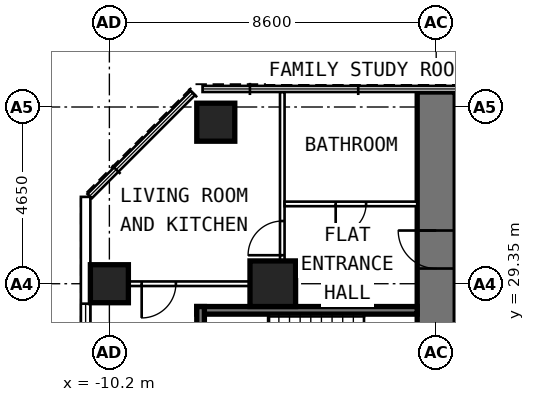
"""IFC4 building model, lengths in metres.
Left out: names, types, materials, properties, quantities, classifications, styles, units other than length and angle.
Written with IfcOpenShell. Run it as: python <this file> out.ifc"""

import sys

from ifc_helpers import new_model, si_unit, direction, frame, frame_2d, origin, origin_2d, place, context, subcontext, project, spatial, rectangle, extrude, element, fill, save


model = new_model("IFC4")
c1 = context("Model", 3, precision=1e-05, world=origin(), true_north=direction((0.0, 1.0)))
c2 = subcontext(c1, "Body", "Model", "MODEL_VIEW")
j1 = project(units=[si_unit("LENGTHUNIT", "METRE"), si_unit("PLANEANGLEUNIT", "RADIAN")], contexts=[c1])
p1 = place(None, origin())
s1 = spatial("IfcSite", under=j1, at=p1, CompositionType="ELEMENT")
p2 = place(p1, origin())
s2 = spatial("IfcBuilding", under=s1, at=p2, CompositionType="ELEMENT")
p3 = place(p2, frame((0.0, 0.0, 61.0)))
s3 = spatial("IfcBuildingStorey", under=s2, at=p3, CompositionType="ELEMENT", Elevation=61.0)
for number, where, z_axis, x_axis in (
    (1, (-10.2, 29.35, 0.0), (0.0, 0.0, 1.0), (0.0, 1.0, 0.0)),
    (2, (-7.4, 33.6, 0.0), (0.0, 0.0, 1.0), (0.0, 1.0, 0.0)),
):
    element("IfcColumn", number, at=place(p3, frame(where, z_axis=z_axis, x_axis=x_axis)), inside=s3, PredefinedType="COLUMN", context=c2, shape_type="SweptSolid", body=[
        extrude(rectangle(XDim=1.0, YDim=1.0, at=origin_2d()), origin(), (0.0, 0.0, 1.0), 3.6),
    ])
p4 = place(p3, frame((-5.9, 29.35, 0.0), z_axis=(0.0, 0.0, 1.0), x_axis=(0.0, 1.0, 0.0)))
e3 = element("IfcColumn", 3, at=p4, inside=s3, PredefinedType="COLUMN", context=c2, shape_type="SweptSolid", body=[
    extrude(rectangle(XDim=1.2, YDim=1.2, at=origin_2d()), origin(), (0.0, 0.0, 1.0), 3.6),
])
p5 = place(p3, frame((-1.6, 23.65, 0.0), z_axis=(0.0, 0.0, 1.0), x_axis=(0.0, 1.0, 0.0)))
e4 = element("IfcWall", 4, at=p5, inside=s3, PredefinedType="SHEAR", context=c2, shape_type="SweptSolid", body=[
    extrude(rectangle(XDim=10.745, YDim=1.0, at=frame_2d((5.373, 0.0))), origin(), (0.0, 0.0, 1.0), 3.6),
])
p6 = place(p5, frame((6.1, 0.0, 0.0)))
e5 = element("IfcOpeningElement", 5, at=p6, cuts=e4, PredefinedType="OPENING", context=c2, shape_type="SweptSolid", body=[
    extrude(rectangle(XDim=1.0, YDim=2.1, at=frame_2d((0.5, 1.05))), frame((0.0, 0.512, 0.0), z_axis=(0.0, -1.0, 0.0), x_axis=(1.0, 0.0, 0.0)), (0.0, 0.0, 1.0), 1.024),
])
p7 = place(p5, frame((1.35, 0.0, 0.0)))
e6 = element("IfcOpeningElement", 6, at=p7, cuts=e4, PredefinedType="OPENING", context=c2, shape_type="SweptSolid", body=[
    extrude(rectangle(XDim=1.0, YDim=2.1, at=frame_2d((0.5, 1.05))), frame((0.0, 0.512, 0.0), z_axis=(0.0, -1.0, 0.0), x_axis=(1.0, 0.0, 0.0)), (0.0, 0.0, 1.0), 1.024),
])
p8 = place(p3, frame((-10.825, 6.148, 0.0), z_axis=(0.0, 0.0, 1.0), x_axis=(0.0, 1.0, 0.0)))
e7 = element("IfcWall", 7, at=p8, inside=s3, PredefinedType="SOLIDWALL", context=c2, shape_type="SweptSolid", body=[
    extrude(rectangle(XDim=25.487, YDim=0.25, at=frame_2d((12.744, 0.0))), origin(), (0.0, 0.0, 1.0), 3.35),
])
p9 = place(p8, frame((0.927, 0.0, 0.8)))
e8 = element("IfcOpeningElement", 8, at=p9, cuts=e7, PredefinedType="OPENING", context=c2, shape_type="SweptSolid", body=[
    extrude(rectangle(XDim=1.8, YDim=1.8, at=frame_2d((0.9, 0.9))), frame((0.0, 0.137, 0.0), z_axis=(0.0, -1.0, 0.0), x_axis=(1.0, 0.0, 0.0)), (0.0, 0.0, 1.0), 0.274),
])
p10 = place(p8, frame((3.777, 0.0, 0.8)))
e9 = element("IfcOpeningElement", 9, at=p10, cuts=e7, PredefinedType="OPENING", context=c2, shape_type="SweptSolid", body=[
    extrude(rectangle(XDim=1.8, YDim=1.8, at=frame_2d((0.9, 0.9))), frame((0.0, 0.137, 0.0), z_axis=(0.0, -1.0, 0.0), x_axis=(1.0, 0.0, 0.0)), (0.0, 0.0, 1.0), 0.274),
])
p11 = place(p8, frame((6.627, 0.0, 0.8)))
e10 = element("IfcOpeningElement", 10, at=p11, cuts=e7, PredefinedType="OPENING", context=c2, shape_type="SweptSolid", body=[
    extrude(rectangle(XDim=1.8, YDim=1.8, at=frame_2d((0.9, 0.9))), frame((0.0, 0.137, 0.0), z_axis=(0.0, -1.0, 0.0), x_axis=(1.0, 0.0, 0.0)), (0.0, 0.0, 1.0), 0.274),
])
p12 = place(p8, frame((9.477, 0.0, 0.8)))
e11 = element("IfcOpeningElement", 11, at=p12, cuts=e7, PredefinedType="OPENING", context=c2, shape_type="SweptSolid", body=[
    extrude(rectangle(XDim=1.8, YDim=1.8, at=frame_2d((0.9, 0.9))), frame((0.0, 0.137, 0.0), z_axis=(0.0, -1.0, 0.0), x_axis=(1.0, 0.0, 0.0)), (0.0, 0.0, 1.0), 0.274),
])
p13 = place(p8, frame((12.327, 0.0, 0.8)))
e12 = element("IfcOpeningElement", 12, at=p13, cuts=e7, PredefinedType="OPENING", context=c2, shape_type="SweptSolid", body=[
    extrude(rectangle(XDim=1.8, YDim=1.8, at=frame_2d((0.9, 0.9))), frame((0.0, 0.137, 0.0), z_axis=(0.0, -1.0, 0.0), x_axis=(1.0, 0.0, 0.0)), (0.0, 0.0, 1.0), 0.274),
])
p14 = place(p8, frame((15.177, 0.0, 0.8)))
e13 = element("IfcOpeningElement", 13, at=p14, cuts=e7, PredefinedType="OPENING", context=c2, shape_type="SweptSolid", body=[
    extrude(rectangle(XDim=1.8, YDim=1.8, at=frame_2d((0.9, 0.9))), frame((0.0, 0.137, 0.0), z_axis=(0.0, -1.0, 0.0), x_axis=(1.0, 0.0, 0.0)), (0.0, 0.0, 1.0), 0.274),
])
p15 = place(p8, frame((18.027, 0.0, 0.8)))
e14 = element("IfcOpeningElement", 14, at=p15, cuts=e7, PredefinedType="OPENING", context=c2, shape_type="SweptSolid", body=[
    extrude(rectangle(XDim=1.8, YDim=1.8, at=frame_2d((0.9, 0.9))), frame((0.0, 0.137, 0.0), z_axis=(0.0, -1.0, 0.0), x_axis=(1.0, 0.0, 0.0)), (0.0, 0.0, 1.0), 0.274),
])
p16 = place(p8, frame((20.877, 0.0, 0.8)))
e15 = element("IfcOpeningElement", 15, at=p16, cuts=e7, PredefinedType="OPENING", context=c2, shape_type="SweptSolid", body=[
    extrude(rectangle(XDim=1.8, YDim=1.8, at=frame_2d((0.9, 0.9))), frame((0.0, 0.137, 0.0), z_axis=(0.0, -1.0, 0.0), x_axis=(1.0, 0.0, 0.0)), (0.0, 0.0, 1.0), 0.274),
])
p17 = place(p3, frame((-5.71, 29.35, 0.0), z_axis=(0.0, 0.0, 1.0), x_axis=(-1.0, 0.0, 0.0)))
e16 = element("IfcWall", 16, at=p17, inside=s3, PredefinedType="PARTITIONING", context=c2, shape_type="SweptSolid", body=[
    extrude(rectangle(XDim=4.99, YDim=0.12, at=frame_2d((2.495, 0.0))), origin(), (0.0, 0.0, 1.0), 2.45),
])
p18 = place(p17, frame((2.74, 0.0, 0.0)))
e17 = element("IfcOpeningElement", 17, at=p18, cuts=e16, PredefinedType="OPENING", context=c2, shape_type="SweptSolid", body=[
    extrude(rectangle(XDim=0.9, YDim=2.1, at=frame_2d((0.45, 1.05))), frame((0.0, 0.072, 0.0), z_axis=(0.0, -1.0, 0.0), x_axis=(1.0, 0.0, 0.0)), (0.0, 0.0, 1.0), 0.144),
])
p19 = place(p3, frame((-5.65, 28.95, 0.0), z_axis=(0.0, 0.0, 1.0), x_axis=(0.0, 1.0, 0.0)))
e18 = element("IfcWall", 18, at=p19, inside=s3, PredefinedType="PARTITIONING", context=c2, shape_type="SweptSolid", body=[
    extrude(rectangle(XDim=5.445, YDim=0.12, at=frame_2d((2.723, 0.0))), origin(), (0.0, 0.0, 1.0), 3.35),
])
p20 = place(p19, frame((1.15, 0.0, 0.0)))
e19 = element("IfcOpeningElement", 19, at=p20, cuts=e18, PredefinedType="OPENING", context=c2, shape_type="SweptSolid", body=[
    extrude(rectangle(XDim=0.9, YDim=2.1, at=frame_2d((0.45, 1.05))), frame((0.0, 0.072, 0.0), z_axis=(0.0, -1.0, 0.0), x_axis=(1.0, 0.0, 0.0)), (0.0, 0.0, 1.0), 0.144),
])
p21 = place(p3, frame((-2.1, 31.45, 0.0), z_axis=(0.0, 0.0, 1.0), x_axis=(-1.0, 0.0, 0.0)))
e20 = element("IfcWall", 20, at=p21, inside=s3, PredefinedType="PARTITIONING", context=c2, shape_type="SweptSolid", body=[
    extrude(rectangle(XDim=3.49, YDim=0.12, at=frame_2d((1.745, 0.0))), origin(), (0.0, 0.0, 1.0), 3.35),
])
p22 = place(p21, frame((1.345, 0.0, 0.0)))
e21 = element("IfcOpeningElement", 21, at=p22, cuts=e20, PredefinedType="OPENING", context=c2, shape_type="SweptSolid", body=[
    extrude(rectangle(XDim=0.8, YDim=2.1, at=frame_2d((0.4, 1.05))), frame((0.0, 0.072, 0.0), z_axis=(0.0, -1.0, 0.0), x_axis=(1.0, 0.0, 0.0)), (0.0, 0.0, 1.0), 0.144),
])
p23 = place(p3, frame((-2.1, 28.65, 0.0), z_axis=(0.0, 0.0, 1.0), x_axis=(-1.0, 0.0, 0.0)))
e22 = element("IfcWall", 22, at=p23, inside=s3, PredefinedType="SHEAR", context=c2, shape_type="SweptSolid", body=[
    extrude(rectangle(XDim=5.8, YDim=0.2, at=frame_2d((2.9, 0.0))), origin(), (0.0, 0.0, 1.0), 3.33),
])
p24 = place(p3, frame((-7.8, 24.75, 0.0), z_axis=(0.0, 0.0, 1.0), x_axis=(0.0, 1.0, 0.0)))
e23 = element("IfcWall", 23, at=p24, inside=s3, PredefinedType="SHEAR", context=c2, shape_type="SweptSolid", body=[
    extrude(rectangle(XDim=4.0, YDim=0.2, at=frame_2d((2.0, 0.0))), origin(), (0.0, 0.0, 1.0), 3.33),
])
p25 = place(p16, origin())
e24 = element("IfcWindow", 24, at=p25, inside=s3, PartitioningType="SINGLE_PANEL", PredefinedType="WINDOW", context=c2, shape_type="SweptSolid", body=[
    extrude(rectangle(XDim=1.8, YDim=1.8, at=frame_2d((0.9, 0.9))), frame((0.0, 0.03, 0.0), z_axis=(0.0, -1.0, 0.0), x_axis=(1.0, 0.0, 0.0)), (0.0, 0.0, 1.0), 0.06),
])
fill(e15, e24)
p26 = place(p18, origin())
e25 = element("IfcDoor", 25, at=p26, inside=s3, OperationType="SINGLE_SWING_RIGHT", PredefinedType="DOOR", context=c2, shape_type="SweptSolid", body=[
    extrude(rectangle(XDim=0.9, YDim=2.1, at=frame_2d((0.45, 1.05))), frame((0.0, 0.025, 0.0), z_axis=(0.0, -1.0, 0.0), x_axis=(1.0, 0.0, 0.0)), (0.0, 0.0, 1.0), 0.05),
])
fill(e17, e25)
p27 = place(p20, origin())
e26 = element("IfcDoor", 26, at=p27, inside=s3, OperationType="SINGLE_SWING_LEFT", PredefinedType="DOOR", context=c2, shape_type="SweptSolid", body=[
    extrude(rectangle(XDim=0.9, YDim=2.1, at=frame_2d((0.45, 1.05))), frame((0.0, 0.025, 0.0), z_axis=(0.0, -1.0, 0.0), x_axis=(1.0, 0.0, 0.0)), (0.0, 0.0, 1.0), 0.05),
])
fill(e19, e26)
p28 = place(p22, origin())
e27 = element("IfcDoor", 27, at=p28, inside=s3, OperationType="SINGLE_SWING_RIGHT", PredefinedType="DOOR", context=c2, shape_type="SweptSolid", body=[
    extrude(rectangle(XDim=0.8, YDim=2.1, at=frame_2d((0.4, 1.05))), frame((0.0, 0.025, 0.0), z_axis=(0.0, -1.0, 0.0), x_axis=(1.0, 0.0, 0.0)), (0.0, 0.0, 1.0), 0.05),
])
fill(e21, e27)
p29 = place(p6, origin())
e28 = element("IfcDoor", 28, at=p29, inside=s3, OperationType="SINGLE_SWING_RIGHT", PredefinedType="DOOR", context=c2, shape_type="SweptSolid", body=[
    extrude(rectangle(XDim=1.0, YDim=2.1, at=frame_2d((0.5, 1.05))), frame((0.0, 0.25, 0.0), z_axis=(0.0, -1.0, 0.0), x_axis=(1.0, 0.0, 0.0)), (0.0, 0.0, 1.0), 0.5),
])
fill(e5, e28)
save(model, sys.argv[1])
